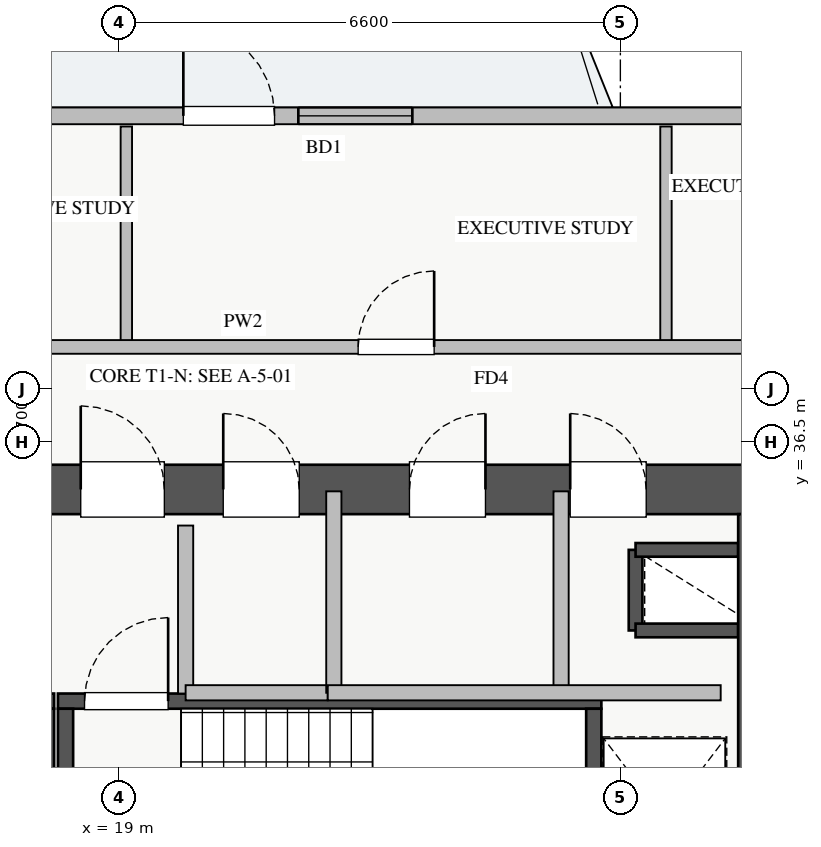
"""IFC4 building model, lengths in metres.
Left out: names, types, materials, properties, quantities, classifications, styles, units other than length and angle.
Written with IfcOpenShell. Run it as: python <this file> out.ifc"""

import sys

from ifc_helpers import new_model, si_unit, direction, frame, frame_2d, origin, place, context, subcontext, project, spatial, rectangle, extrude, source, transform, mapped, element, fill, save


model = new_model("IFC4")
c1 = context("Model", 3, precision=1e-05, world=origin(), true_north=direction((0.0, 1.0)))
c2 = subcontext(c1, "Body", "Model", "MODEL_VIEW")
j1 = project(units=[si_unit("LENGTHUNIT", "METRE"), si_unit("PLANEANGLEUNIT", "RADIAN")], contexts=[c1])
p1 = place(None, origin())
s1 = spatial("IfcSite", under=j1, at=p1, CompositionType="ELEMENT")
p2 = place(p1, origin())
s2 = spatial("IfcBuilding", under=s1, at=p2, CompositionType="ELEMENT")
p3 = place(p2, frame((0.0, 0.0, 116.5)))
s3 = spatial("IfcBuildingStorey", under=s2, at=p3, CompositionType="ELEMENT", Elevation=116.5)
p4 = place(p3, frame((25.8, 34.02, 0.0), z_axis=(0.0, 0.0, 1.0), x_axis=(0.0, 1.0, 0.0)))
e1 = element("IfcWall", 1, at=p4, inside=s3, PredefinedType="SHEAR", context=c2, shape_type="SweptSolid", body=[
    extrude(rectangle(XDim=1.06, YDim=0.18, at=frame_2d((0.53, 0.0))), origin(), (0.0, 0.0, 1.0), 3.07),
])
for number, where, z_axis, x_axis in (
    (2, (25.8, 35.08, 0.0), (0.0, 0.0, 1.0), (1.0, 0.0, 0.0)),
    (3, (25.8, 34.02, 0.0), (0.0, 0.0, 1.0), (1.0, 0.0, 0.0)),
):
    element("IfcWall", number, at=place(p3, frame(where, z_axis=z_axis, x_axis=x_axis)), inside=s3, PredefinedType="SHEAR", context=c2, shape_type="SweptSolid", body=[
        extrude(rectangle(XDim=1.35, YDim=0.18, at=frame_2d((0.675, 0.0))), origin(), (0.0, 0.0, 1.0), 3.07),
    ])
p5 = place(p3, frame((10.85, 33.09, 0.0), z_axis=(0.0, 0.0, 1.0), x_axis=(1.0, 0.0, 0.0)))
e4 = element("IfcWall", 4, at=p5, inside=s3, PredefinedType="SHEAR", context=c2, shape_type="SweptSolid", body=[
    extrude(rectangle(XDim=7.3, YDim=0.2, at=frame_2d((3.65, 0.0))), origin(), (0.0, 0.0, 1.0), 3.25),
])
p6 = place(p5, frame((0.35, 0.0, 0.0)))
e5 = element("IfcOpeningElement", 5, at=p6, cuts=e4, PredefinedType="OPENING", context=c2, shape_type="SweptSolid", body=[
    extrude(rectangle(XDim=1.1, YDim=2.05, at=frame_2d((0.55, 1.025))), frame((0.0, 0.11, 0.0), z_axis=(0.0, -1.0, 0.0), x_axis=(1.0, 0.0, 0.0)), (0.0, 0.0, 1.0), 0.22),
])
p7 = place(p3, frame((18.05, 30.05, 0.0), z_axis=(0.0, 0.0, 1.0), x_axis=(0.0, 1.0, 0.0)))
e6 = element("IfcWall", 6, at=p7, inside=s3, PredefinedType="SHEAR", context=c2, shape_type="SweptSolid", body=[
    extrude(rectangle(XDim=2.94, YDim=0.2, at=frame_2d((1.47, 0.0))), origin(), (0.0, 0.0, 1.0), 3.25),
])
p8 = place(p3, frame((18.2, 33.09, 0.0), z_axis=(0.0, 0.0, 1.0), x_axis=(1.0, 0.0, 0.0)))
e7 = element("IfcWall", 7, at=p8, inside=s3, PredefinedType="SHEAR", context=c2, shape_type="SweptSolid", body=[
    extrude(rectangle(XDim=7.15, YDim=0.2, at=frame_2d((3.575, 0.0))), origin(), (0.0, 0.0, 1.0), 3.25),
])
p9 = place(p8, frame((0.35, 0.0, 0.0)))
e8 = element("IfcOpeningElement", 8, at=p9, cuts=e7, PredefinedType="OPENING", context=c2, shape_type="SweptSolid", body=[
    extrude(rectangle(XDim=1.1, YDim=2.05, at=frame_2d((0.55, 1.025))), frame((0.0, 0.11, 0.0), z_axis=(0.0, -1.0, 0.0), x_axis=(1.0, 0.0, 0.0)), (0.0, 0.0, 1.0), 0.22),
])
for number, where, z_axis, x_axis in (
    (9, (18.3, 30.05, 0.0), (0.0, 0.0, 1.0), (0.0, 1.0, 0.0)),
    (10, (25.25, 30.05, 0.0), (0.0, 0.0, 1.0), (0.0, 1.0, 0.0)),
):
    element("IfcWall", number, at=place(p3, frame(where, z_axis=z_axis, x_axis=x_axis)), inside=s3, PredefinedType="SHEAR", context=c2, shape_type="SweptSolid", body=[
        extrude(rectangle(XDim=2.94, YDim=0.2, at=frame_2d((1.47, 0.0))), origin(), (0.0, 0.0, 1.0), 3.25),
    ])
p10 = place(p3, frame((10.2, 35.875, 0.0), z_axis=(0.0, 0.0, 1.0), x_axis=(1.0, 0.0, 0.0)))
e11 = element("IfcWall", 11, at=p10, inside=s3, PredefinedType="SHEAR", context=c2, shape_type="SweptSolid", body=[
    extrude(rectangle(XDim=17.6, YDim=0.65, at=frame_2d((8.8, 0.0))), origin(), (0.0, 0.0, 1.0), 3.25),
])
p11 = place(p10, frame((1.15, 0.0, 0.0)))
e12 = element("IfcOpeningElement", 12, at=p11, cuts=e11, PredefinedType="OPENING", context=c2, shape_type="SweptSolid", body=[
    extrude(rectangle(XDim=1.1, YDim=2.05, at=frame_2d((0.55, 1.025))), frame((0.0, 0.335, 0.0), z_axis=(0.0, -1.0, 0.0), x_axis=(1.0, 0.0, 0.0)), (0.0, 0.0, 1.0), 0.67),
])
p12 = place(p10, frame((8.3, 0.0, 0.0)))
e13 = element("IfcOpeningElement", 13, at=p12, cuts=e11, PredefinedType="OPENING", context=c2, shape_type="SweptSolid", body=[
    extrude(rectangle(XDim=1.1, YDim=2.05, at=frame_2d((0.55, 1.025))), frame((0.0, 0.335, 0.0), z_axis=(0.0, -1.0, 0.0), x_axis=(1.0, 0.0, 0.0)), (0.0, 0.0, 1.0), 0.67),
])
p13 = place(p10, frame((4.9, 0.0, 0.0)))
e14 = element("IfcOpeningElement", 14, at=p13, cuts=e11, PredefinedType="OPENING", context=c2, shape_type="SweptSolid", body=[
    extrude(rectangle(XDim=1.1, YDim=2.05, at=frame_2d((0.55, 1.025))), frame((0.0, 0.335, 0.0), z_axis=(0.0, -1.0, 0.0), x_axis=(1.0, 0.0, 0.0)), (0.0, 0.0, 1.0), 0.67),
])
p14 = place(p10, frame((14.74, 0.0, 0.0)))
e15 = element("IfcOpeningElement", 15, at=p14, cuts=e11, PredefinedType="OPENING", context=c2, shape_type="SweptSolid", body=[
    extrude(rectangle(XDim=1.0, YDim=2.05, at=frame_2d((0.5, 1.025))), frame((0.0, 0.335, 0.0), z_axis=(0.0, -1.0, 0.0), x_axis=(1.0, 0.0, 0.0)), (0.0, 0.0, 1.0), 0.67),
])
p15 = place(p10, frame((10.175, 0.0, 0.0)))
e16 = element("IfcOpeningElement", 16, at=p15, cuts=e11, PredefinedType="OPENING", context=c2, shape_type="SweptSolid", body=[
    extrude(rectangle(XDim=1.0, YDim=2.05, at=frame_2d((0.5, 1.025))), frame((0.0, 0.335, 0.0), z_axis=(0.0, -1.0, 0.0), x_axis=(1.0, 0.0, 0.0)), (0.0, 0.0, 1.0), 0.67),
])
p16 = place(p10, frame((12.625, 0.0, 0.0)))
e17 = element("IfcOpeningElement", 17, at=p16, cuts=e11, PredefinedType="OPENING", context=c2, shape_type="SweptSolid", body=[
    extrude(rectangle(XDim=1.0, YDim=2.05, at=frame_2d((0.5, 1.025))), frame((0.0, 0.335, 0.0), z_axis=(0.0, -1.0, 0.0), x_axis=(1.0, 0.0, 0.0)), (0.0, 0.0, 1.0), 0.67),
])
p17 = place(p3, frame((27.475, 29.65, 0.0), z_axis=(0.0, 0.0, 1.0), x_axis=(0.0, 1.0, 0.0)))
e18 = element("IfcWall", 18, at=p17, inside=s3, PredefinedType="SHEAR", context=c2, shape_type="SweptSolid", body=[
    extrude(rectangle(XDim=5.9, YDim=0.65, at=frame_2d((2.95, 0.0))), origin(), (0.0, 0.0, 1.0), 3.25),
])
p18 = place(p17, frame((1.1, 0.0, 0.0)))
e19 = element("IfcOpeningElement", 19, at=p18, cuts=e18, PredefinedType="OPENING", context=c2, shape_type="SweptSolid", body=[
    extrude(rectangle(XDim=1.3, YDim=2.05, at=frame_2d((0.65, 1.025))), frame((0.0, 0.335, 0.0), z_axis=(0.0, -1.0, 0.0), x_axis=(1.0, 0.0, 0.0)), (0.0, 0.0, 1.0), 0.67),
])
p19 = place(p3, frame((6.55, 40.79, 0.0), z_axis=(0.0, 0.0, 1.0), x_axis=(1.0, 0.0, 0.0)))
e20 = element("IfcWall", 20, at=p19, inside=s3, PredefinedType="STANDARD", context=c2, shape_type="SweptSolid", body=[
    extrude(rectangle(XDim=24.9, YDim=0.22, at=frame_2d((12.45, 0.0))), origin(), (0.0, 0.0, 1.0), 2.61),
])
p20 = place(p19, frame((13.3, 0.0, 0.0)))
e21 = element("IfcOpeningElement", 21, at=p20, cuts=e20, PredefinedType="OPENING", context=c2, shape_type="SweptSolid", body=[
    extrude(rectangle(XDim=1.2, YDim=2.1, at=frame_2d((0.6, 1.05))), frame((0.0, 0.12, 0.0), z_axis=(0.0, -1.0, 0.0), x_axis=(1.0, 0.0, 0.0)), (0.0, 0.0, 1.0), 0.24),
])
p21 = place(p19, frame((3.635, 0.0, 0.9)))
e22 = element("IfcOpeningElement", 22, at=p21, cuts=e20, PredefinedType="OPENING", context=c2, shape_type="SweptSolid", body=[
    extrude(rectangle(XDim=2.4, YDim=1.5, at=frame_2d((1.2, 0.75))), frame((0.0, 0.12, 0.0), z_axis=(0.0, -1.0, 0.0), x_axis=(1.0, 0.0, 0.0)), (0.0, 0.0, 1.0), 0.24),
])
p22 = place(p19, frame((8.438, 0.0, 0.9)))
e23 = element("IfcOpeningElement", 23, at=p22, cuts=e20, PredefinedType="OPENING", context=c2, shape_type="SweptSolid", body=[
    extrude(rectangle(XDim=1.8, YDim=1.45, at=frame_2d((0.9, 0.725))), frame((0.0, 0.12, 0.0), z_axis=(0.0, -1.0, 0.0), x_axis=(1.0, 0.0, 0.0)), (0.0, 0.0, 1.0), 0.24),
])
p23 = place(p19, frame((14.813, 0.0, 0.9)))
e24 = element("IfcOpeningElement", 24, at=p23, cuts=e20, PredefinedType="OPENING", context=c2, shape_type="SweptSolid", body=[
    extrude(rectangle(XDim=1.5, YDim=1.45, at=frame_2d((0.75, 0.725))), frame((0.0, 0.12, 0.0), z_axis=(0.0, -1.0, 0.0), x_axis=(1.0, 0.0, 0.0)), (0.0, 0.0, 1.0), 0.24),
])
p24 = place(p19, frame((20.738, 0.0, 0.9)))
e25 = element("IfcOpeningElement", 25, at=p24, cuts=e20, PredefinedType="OPENING", context=c2, shape_type="SweptSolid", body=[
    extrude(rectangle(XDim=2.1, YDim=1.48, at=frame_2d((1.05, 0.74))), frame((0.0, 0.12, 0.0), z_axis=(0.0, -1.0, 0.0), x_axis=(1.0, 0.0, 0.0)), (0.0, 0.0, 1.0), 0.24),
])
p25 = place(p19, frame((0.258, 0.0, 0.9)))
e26 = element("IfcOpeningElement", 26, at=p25, cuts=e20, PredefinedType="OPENING", context=c2, shape_type="SweptSolid", body=[
    extrude(rectangle(XDim=1.8, YDim=1.5, at=frame_2d((0.9, 0.75))), frame((0.0, 0.12, 0.0), z_axis=(0.0, -1.0, 0.0), x_axis=(1.0, 0.0, 0.0)), (0.0, 0.0, 1.0), 0.24),
])
p26 = place(p3, frame((19.88, 33.19, 0.0), z_axis=(0.0, 0.0, 1.0), x_axis=(0.0, 1.0, 0.0)))
e27 = element("IfcWall", 27, at=p26, inside=s3, PredefinedType="PARTITIONING", context=c2, shape_type="SweptSolid", body=[
    extrude(rectangle(XDim=2.21, YDim=0.2, at=frame_2d((1.105, 0.0))), origin(), (0.0, 0.0, 1.0), 3.07),
])
p27 = place(p3, frame((24.82, 33.2, 0.0), z_axis=(0.0, 0.0, 1.0), x_axis=(0.0, 1.0, 0.0)))
e28 = element("IfcWall", 28, at=p27, inside=s3, PredefinedType="PARTITIONING", context=c2, shape_type="SweptSolid", body=[
    extrude(rectangle(XDim=2.65, YDim=0.2, at=frame_2d((1.325, 0.0))), origin(), (0.0, 0.0, 1.0), 3.07),
])
p28 = place(p3, frame((19.88, 33.2, 0.0), z_axis=(0.0, 0.0, 1.0), x_axis=(1.0, 0.0, 0.0)))
e29 = element("IfcWall", 29, at=p28, inside=s3, PredefinedType="PARTITIONING", context=c2, shape_type="SweptSolid", body=[
    extrude(rectangle(XDim=1.87, YDim=0.2, at=frame_2d((0.935, 0.0))), origin(), (0.0, 0.0, 1.0), 3.07),
])
p29 = place(p3, frame((21.83, 33.2, 0.0), z_axis=(0.0, 0.0, 1.0), x_axis=(0.0, 1.0, 0.0)))
e30 = element("IfcWall", 30, at=p29, inside=s3, PredefinedType="PARTITIONING", context=c2, shape_type="SweptSolid", body=[
    extrude(rectangle(XDim=2.65, YDim=0.2, at=frame_2d((1.325, 0.0))), origin(), (0.0, 0.0, 1.0), 3.07),
])
p30 = place(p3, frame((21.75, 33.2, 0.0), z_axis=(0.0, 0.0, 1.0), x_axis=(1.0, 0.0, 0.0)))
e31 = element("IfcWall", 31, at=p30, inside=s3, PredefinedType="PARTITIONING", context=c2, shape_type="SweptSolid", body=[
    extrude(rectangle(XDim=5.17, YDim=0.2, at=frame_2d((2.585, 0.0))), origin(), (0.0, 0.0, 1.0), 3.07),
])
p31 = place(p3, frame((19.1, 37.75, 0.0), z_axis=(0.0, 0.0, 1.0), x_axis=(0.0, 1.0, 0.0)))
e32 = element("IfcWall", 32, at=p31, inside=s3, PredefinedType="PARTITIONING", context=c2, shape_type="SweptSolid", body=[
    extrude(rectangle(XDim=2.9, YDim=0.15, at=frame_2d((1.45, 0.0))), origin(), (0.0, 0.0, 1.0), 2.815),
])
p32 = place(p3, frame((26.2, 37.75, 0.0), z_axis=(0.0, 0.0, 1.0), x_axis=(0.0, 1.0, 0.0)))
e33 = element("IfcWall", 33, at=p32, inside=s3, PredefinedType="PARTITIONING", context=c2, shape_type="SweptSolid", body=[
    extrude(rectangle(XDim=2.9, YDim=0.15, at=frame_2d((1.45, 0.0))), origin(), (0.0, 0.0, 1.0), 3.07),
])
p33 = place(p3, frame((8.85, 37.75, 0.0), z_axis=(0.0, 0.0, 1.0), x_axis=(1.0, 0.0, 0.0)))
e34 = element("IfcWall", 34, at=p33, inside=s3, PredefinedType="PARTITIONING", context=c2, shape_type="SweptSolid", body=[
    extrude(rectangle(XDim=23.57, YDim=0.18, at=frame_2d((11.785, 0.0))), origin(), (0.0, 0.0, 1.0), 3.07),
])
p34 = place(p33, frame((2.035, 0.0, 0.0)))
e35 = element("IfcOpeningElement", 35, at=p34, cuts=e34, PredefinedType="OPENING", context=c2, shape_type="SweptSolid", body=[
    extrude(rectangle(XDim=1.0, YDim=2.05, at=frame_2d((0.5, 1.025))), frame((0.0, 0.1, 0.0), z_axis=(0.0, -1.0, 0.0), x_axis=(1.0, 0.0, 0.0)), (0.0, 0.0, 1.0), 0.2),
])
p35 = place(p33, frame((7.16, 0.0, 0.0)))
e36 = element("IfcOpeningElement", 36, at=p35, cuts=e34, PredefinedType="OPENING", context=c2, shape_type="SweptSolid", body=[
    extrude(rectangle(XDim=1.0, YDim=2.05, at=frame_2d((0.5, 1.025))), frame((0.0, 0.1, 0.0), z_axis=(0.0, -1.0, 0.0), x_axis=(1.0, 0.0, 0.0)), (0.0, 0.0, 1.0), 0.2),
])
p36 = place(p33, frame((13.3, 0.0, 0.0)))
e37 = element("IfcOpeningElement", 37, at=p36, cuts=e34, PredefinedType="OPENING", context=c2, shape_type="SweptSolid", body=[
    extrude(rectangle(XDim=1.0, YDim=2.05, at=frame_2d((0.5, 1.025))), frame((0.0, 0.1, 0.0), z_axis=(0.0, -1.0, 0.0), x_axis=(1.0, 0.0, 0.0)), (0.0, 0.0, 1.0), 0.2),
])
p37 = place(p33, frame((19.74, 0.0, 0.0)))
e38 = element("IfcOpeningElement", 38, at=p37, cuts=e34, PredefinedType="OPENING", context=c2, shape_type="SweptSolid", body=[
    extrude(rectangle(XDim=1.0, YDim=2.05, at=frame_2d((0.5, 1.025))), frame((0.0, 0.1, 0.0), z_axis=(0.0, -1.0, 0.0), x_axis=(1.0, 0.0, 0.0)), (0.0, 0.0, 1.0), 0.2),
])
m1 = source(origin(), c2, "Body", "SweptSolid", [
    extrude(rectangle(XDim=1.2, YDim=2.1, at=frame_2d((0.6, 1.05))), frame((0.0, 0.025, 0.0), z_axis=(0.0, -1.0, 0.0), x_axis=(1.0, 0.0, 0.0)), (0.0, 0.0, 1.0), 0.05),
])
p38 = place(p20, origin())
e39 = element("IfcDoor", 39, at=p38, inside=s3, OperationType="SINGLE_SWING_LEFT", PredefinedType="DOOR", context=c2, shape_type="MappedRepresentation", body=[
    mapped(m1, transform((0.0, 0.0, 0.0), x_axis=(1.0, 0.0, 0.0), y_axis=(0.0, 1.0, 0.0), z_axis=(0.0, 0.0, 1.0), scale=1.0)),
])
fill(e21, e39)
m2 = source(origin(), c2, "Body", "SweptSolid", [
    extrude(rectangle(XDim=1.5, YDim=1.45, at=frame_2d((0.75, 0.725))), frame((0.0, 0.03, 0.0), z_axis=(0.0, -1.0, 0.0), x_axis=(1.0, 0.0, 0.0)), (0.0, 0.0, 1.0), 0.06),
])
p39 = place(p23, origin())
e40 = element("IfcWindow", 40, at=p39, inside=s3, PartitioningType="DOUBLE_PANEL_VERTICAL", PredefinedType="WINDOW", context=c2, shape_type="MappedRepresentation", body=[
    mapped(m2, transform((0.0, 0.0, 0.0), x_axis=(1.0, 0.0, 0.0), y_axis=(0.0, 1.0, 0.0), z_axis=(0.0, 0.0, 1.0), scale=1.0)),
])
fill(e24, e40)
m3 = source(origin(), c2, "Body", "SweptSolid", [
    extrude(rectangle(XDim=1.1, YDim=2.05, at=frame_2d((0.55, 1.025))), frame((0.0, 0.025, 0.0), z_axis=(0.0, -1.0, 0.0), x_axis=(1.0, 0.0, 0.0)), (0.0, 0.0, 1.0), 0.05),
])
p40 = place(p12, origin())
e41 = element("IfcDoor", 41, at=p40, inside=s3, OperationType="SINGLE_SWING_LEFT", PredefinedType="DOOR", context=c2, shape_type="MappedRepresentation", body=[
    mapped(m3, transform((0.0, 0.0, 0.0), x_axis=(1.0, 0.0, 0.0), y_axis=(0.0, 1.0, 0.0), z_axis=(0.0, 0.0, 1.0), scale=1.0)),
])
fill(e13, e41)
p41 = place(p9, origin())
e42 = element("IfcDoor", 42, at=p41, inside=s3, OperationType="SINGLE_SWING_RIGHT", PredefinedType="DOOR", context=c2, shape_type="MappedRepresentation", body=[
    mapped(m3, transform((0.0, 0.0, 0.0), x_axis=(1.0, 0.0, 0.0), y_axis=(0.0, 1.0, 0.0), z_axis=(0.0, 0.0, 1.0), scale=1.0)),
])
fill(e8, e42)
m4 = source(origin(), c2, "Body", "SweptSolid", [
    extrude(rectangle(XDim=1.0, YDim=2.05, at=frame_2d((0.5, 1.025))), frame((0.0, 0.025, 0.0), z_axis=(0.0, -1.0, 0.0), x_axis=(1.0, 0.0, 0.0)), (0.0, 0.0, 1.0), 0.05),
])
p42 = place(p14, origin())
e43 = element("IfcDoor", 43, at=p42, inside=s3, OperationType="SINGLE_SWING_LEFT", PredefinedType="DOOR", context=c2, shape_type="MappedRepresentation", body=[
    mapped(m4, transform((0.0, 0.0, 0.0), x_axis=(1.0, 0.0, 0.0), y_axis=(0.0, 1.0, 0.0), z_axis=(0.0, 0.0, 1.0), scale=1.0)),
])
fill(e15, e43)
p43 = place(p15, origin())
e44 = element("IfcDoor", 44, at=p43, inside=s3, OperationType="SINGLE_SWING_LEFT", PredefinedType="DOOR", context=c2, shape_type="MappedRepresentation", body=[
    mapped(m4, transform((0.0, 0.0, 0.0), x_axis=(1.0, 0.0, 0.0), y_axis=(0.0, 1.0, 0.0), z_axis=(0.0, 0.0, 1.0), scale=1.0)),
])
fill(e16, e44)
p44 = place(p16, origin())
e45 = element("IfcDoor", 45, at=p44, inside=s3, OperationType="SINGLE_SWING_RIGHT", PredefinedType="DOOR", context=c2, shape_type="MappedRepresentation", body=[
    mapped(m4, transform((0.0, 0.0, 0.0), x_axis=(1.0, 0.0, 0.0), y_axis=(0.0, 1.0, 0.0), z_axis=(0.0, 0.0, 1.0), scale=1.0)),
])
fill(e17, e45)
p45 = place(p36, origin())
e46 = element("IfcDoor", 46, at=p45, inside=s3, OperationType="SINGLE_SWING_RIGHT", PredefinedType="DOOR", context=c2, shape_type="MappedRepresentation", body=[
    mapped(m4, transform((0.0, 0.0, 0.0), x_axis=(1.0, 0.0, 0.0), y_axis=(0.0, 1.0, 0.0), z_axis=(0.0, 0.0, 1.0), scale=1.0)),
])
fill(e37, e46)
save(model, sys.argv[1])
